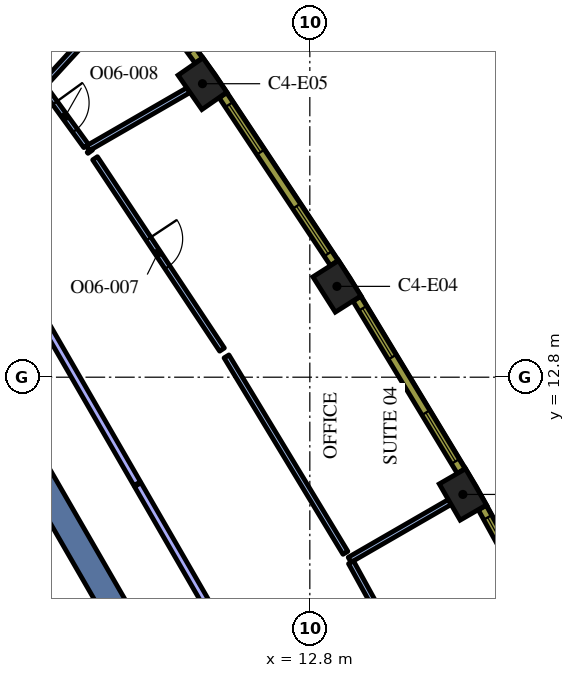
"""IFC4 building model, lengths in metres.
Left out: names, types, materials, properties, quantities, classifications, styles, units other than length and angle.
Written with IfcOpenShell. Run it as: python <this file> out.ifc"""

import sys

from ifc_helpers import new_model, si_unit, direction, frame, frame_2d, origin, origin_2d, place, context, subcontext, project, spatial, polyline, rectangle, outline, extrude, element, fill, save


model = new_model("IFC4")
c1 = context("Model", 3, precision=1e-05, world=origin(), true_north=direction((0.0, 1.0)))
c2 = subcontext(c1, "Body", "Model", "MODEL_VIEW")
j1 = project(units=[si_unit("LENGTHUNIT", "METRE"), si_unit("PLANEANGLEUNIT", "RADIAN")], contexts=[c1])
p1 = place(None, origin())
s1 = spatial("IfcSite", under=j1, at=p1, CompositionType="ELEMENT")
p2 = place(p1, origin())
s2 = spatial("IfcBuilding", under=s1, at=p2, CompositionType="ELEMENT")
p3 = place(p2, frame((0.0, 0.0, 210.0)))
s3 = spatial("IfcBuildingStorey", under=s2, at=p3, CompositionType="ELEMENT", Elevation=210.0)
for number, where, z_axis, x_axis in (
    (1, (16.827, 9.715, 0.0), (0.0, 0.0, 1.0), (-0.5, 0.866, 0.0)),
    (2, (13.513, 15.19, 0.0), (0.0, 0.0, 1.0), (-0.536, 0.845, 0.0)),
    (3, (9.975, 20.522, 0.0), (0.0, 0.0, 1.0), (-0.57, 0.822, 0.0)),
):
    element("IfcColumn", number, at=place(p3, frame(where, z_axis=z_axis, x_axis=x_axis)), inside=s3, PredefinedType="COLUMN", context=c2, shape_type="SweptSolid", body=[
        extrude(rectangle(XDim=1.1, YDim=0.8, at=origin_2d()), origin(), (0.0, 0.0, 1.0), 4.2),
    ])
p4 = place(p3, frame((8.235, 5.736, 0.0), z_axis=(0.0, 0.0, 1.0), x_axis=(-0.499983401189, 0.8660349869, 0.0)))
e4 = element("IfcWall", 4, at=p4, inside=s3, PredefinedType="SOLIDWALL", context=c2, shape_type="SweptSolid", body=[
    extrude(rectangle(XDim=12.472, YDim=0.7, at=frame_2d((6.236, 0.0))), origin(), (0.0, 0.0, 1.0), 4.2),
])
p5 = place(p3, origin())
e5 = element("IfcWall", 5, at=p5, inside=s3, PredefinedType="SOLIDWALL", context=c2, shape_type="SweptSolid", body=[
    extrude(outline(polyline([(0.332, 6.925), (0.335, 6.925), (0.335, 6.925), (0.335, 6.925), (0.335, 7.075), (0.335, 7.075), (0.335, 7.075), (0.245, 7.075), (0.035, 7.439), (0.252, 7.564), (0.377, 7.348), (1.512, 5.382), (1.637, 5.165), (2.221, 4.153), (2.771, 3.199), (2.896, 2.983), (3.138, 2.564), (4.031, 1.017), (4.156, 0.801), (5.292, -1.165), (5.417, -1.382), (6.073, -2.519), (6.552, -3.348), (6.677, -3.564), (6.46, -3.689), (0.332, 6.925)])), origin(), (0.0, 0.0, 1.0), 4.2),
])
p6 = place(p3, frame((8.565, -2.185, 0.0), z_axis=(0.0, 0.0, 1.0), x_axis=(-0.499997954832, 0.866026584559, 0.0)))
e6 = element("IfcWall", 6, at=p6, inside=s3, PredefinedType="SOLIDWALL", context=c2, shape_type="SweptSolid", body=[
    extrude(rectangle(XDim=12.35, YDim=0.25, at=frame_2d((6.175, 0.0))), origin(), (0.0, 0.0, 1.0), 4.2),
])
p7 = place(p6, frame((0.585, 0.0, 0.0)))
e7 = element("IfcOpeningElement", 7, at=p7, cuts=e6, PredefinedType="OPENING", context=c2, shape_type="SweptSolid", body=[
    extrude(rectangle(XDim=1.1, YDim=2.1, at=frame_2d((0.55, 1.05))), frame((0.0, 0.135, 0.0), z_axis=(0.0, -1.0, 0.0), x_axis=(1.0, 0.0, 0.0)), (0.0, 0.0, 1.0), 0.27),
])
p8 = place(p3, frame((13.848, 7.995, 0.0), z_axis=(0.0, 0.0, 1.0), x_axis=(0.86603583403, 0.49998193385, 0.0)))
e8 = element("IfcWall", 8, at=p8, inside=s3, PredefinedType="PARTITIONING", context=c2, shape_type="SweptSolid", body=[
    extrude(rectangle(XDim=3.041, YDim=0.15, at=frame_2d((1.52, 0.0))), origin(), (0.0, 0.0, 1.0), 3.45),
])
p9 = place(p3, frame((16.76, 2.7, 0.0), z_axis=(0.0, 0.0, 1.0), x_axis=(-0.481907755985, 0.876221955169, 0.0)))
e9 = element("IfcWall", 9, at=p9, inside=s3, PredefinedType="PARTITIONING", context=c2, shape_type="SweptSolid", body=[
    extrude(rectangle(XDim=5.967, YDim=0.15, at=frame_2d((2.984, 0.0))), origin(), (0.0, 0.0, 1.0), 3.45),
])
p10 = place(p3, frame((6.958, 18.823, 0.0), z_axis=(0.0, 0.0, 1.0), x_axis=(0.866008752819, 0.500028839209, 0.0)))
e10 = element("IfcWall", 10, at=p10, inside=s3, PredefinedType="PARTITIONING", context=c2, shape_type="SweptSolid", body=[
    extrude(rectangle(XDim=3.058, YDim=0.15, at=frame_2d((1.529, 0.0))), origin(), (0.0, 0.0, 1.0), 3.45),
])
p11 = place(p3, frame((13.737, 8.178, 0.0), z_axis=(0.0, 0.0, 1.0), x_axis=(-0.517884383874, 0.855450620983, 0.0)))
e11 = element("IfcWall", 11, at=p11, inside=s3, PredefinedType="PARTITIONING", context=c2, shape_type="SweptSolid", body=[
    extrude(rectangle(XDim=6.043, YDim=0.15, at=frame_2d((3.021, 0.0))), origin(), (0.0, 0.0, 1.0), 3.45),
])
p12 = place(p3, frame((7.148, 18.561, 0.0), z_axis=(0.0, 0.0, 1.0), x_axis=(0.552890023891, -0.833254235802, 0.0)))
e12 = element("IfcWall", 12, at=p12, inside=s3, PredefinedType="PARTITIONING", context=c2, shape_type="SweptSolid", body=[
    extrude(rectangle(XDim=6.042, YDim=0.15, at=frame_2d((3.021, 0.0))), origin(), (0.0, 0.0, 1.0), 3.45),
])
p13 = place(p12, frame((2.542, 0.0, 0.0)))
e13 = element("IfcOpeningElement", 13, at=p13, cuts=e12, PredefinedType="OPENING", context=c2, shape_type="SweptSolid", body=[
    extrude(rectangle(XDim=0.9, YDim=2.1, at=frame_2d((0.45, 1.05))), frame((0.0, 0.085, 0.0), z_axis=(0.0, -1.0, 0.0), x_axis=(1.0, 0.0, 0.0)), (0.0, 0.0, 1.0), 0.17),
])
p14 = place(p3, frame((7.022, 18.734, 0.0), z_axis=(0.0, 0.0, 1.0), x_axis=(-0.585233084123, 0.810865116556, 0.0)))
e14 = element("IfcWall", 14, at=p14, inside=s3, PredefinedType="PARTITIONING", context=c2, shape_type="SweptSolid", body=[
    extrude(rectangle(XDim=0.035, YDim=0.15, at=frame_2d((0.017, 0.0))), origin(), (0.0, 0.0, 1.0), 3.45),
])
p15 = place(p3, frame((5.764, 20.469, 0.0), z_axis=(0.0, 0.0, 1.0), x_axis=(0.586969615341, -0.809608961577, 0.0)))
e15 = element("IfcWall", 15, at=p15, inside=s3, PredefinedType="PARTITIONING", context=c2, shape_type="SweptSolid", body=[
    extrude(rectangle(XDim=1.957, YDim=0.15, at=frame_2d((0.979, 0.0))), origin(), (0.0, 0.0, 1.0), 3.45),
])
p16 = place(p15, frame((0.558, 0.0, 0.0)))
e16 = element("IfcOpeningElement", 16, at=p16, cuts=e15, PredefinedType="OPENING", context=c2, shape_type="SweptSolid", body=[
    extrude(rectangle(XDim=0.9, YDim=2.1, at=frame_2d((0.45, 1.05))), frame((0.0, 0.085, 0.0), z_axis=(0.0, -1.0, 0.0), x_axis=(1.0, 0.0, 0.0)), (0.0, 0.0, 1.0), 0.17),
])
p17 = place(p3, frame((5.816, 20.526, 0.0), z_axis=(0.0, 0.0, 1.0), x_axis=(0.675700046709, 0.737176672771, 0.0)))
e17 = element("IfcWall", 17, at=p17, inside=s3, PredefinedType="PARTITIONING", context=c2, shape_type="SweptSolid", body=[
    extrude(rectangle(XDim=3.598, YDim=0.15, at=frame_2d((1.799, 0.0))), origin(), (0.0, 0.0, 1.0), 3.45),
])
p18 = place(p3, frame((12.772, 2.178, 0.0), z_axis=(0.0, 0.0, 1.0), x_axis=(-0.5000018851, 0.866024315419, 0.0)))
e18 = element("IfcWall", 18, at=p18, inside=s3, PredefinedType="PARTITIONING", context=c2, shape_type="SweptSolid", body=[
    extrude(rectangle(XDim=9.0, YDim=0.2, at=frame_2d((4.5, 0.0))), origin(), (0.0, 0.0, 1.0), 3.45),
])
p19 = place(p3, frame((8.257, 9.998, 0.0), z_axis=(0.0, 0.0, 1.0), x_axis=(-0.499998405424, 0.866026324412, 0.0)))
e19 = element("IfcWall", 19, at=p19, inside=s3, PredefinedType="PARTITIONING", context=c2, shape_type="SweptSolid", body=[
    extrude(rectangle(XDim=9.267, YDim=0.2, at=frame_2d((4.633, 0.0))), origin(), (0.0, 0.0, 1.0), 3.45),
])
p20 = place(p3, frame((19.892, 4.725, 0.0), z_axis=(0.0, 0.0, 1.0), x_axis=(-0.481925825015, 0.876212017256, 0.0)))
e20 = element("IfcWall", 20, at=p20, inside=s3, PredefinedType="SOLIDWALL", context=c2, shape_type="SweptSolid", body=[
    extrude(rectangle(XDim=5.299, YDim=0.24, at=frame_2d((2.649, 0.0))), origin(), (0.0, 0.0, 1.0), 3.95),
])
p21 = place(p20, frame((0.295, 0.0, 0.9)))
e21 = element("IfcOpeningElement", 21, at=p21, cuts=e20, PredefinedType="OPENING", context=c2, shape_type="SweptSolid", body=[
    extrude(rectangle(XDim=1.5, YDim=2.55, at=frame_2d((0.75, 1.275))), frame((0.0, 0.13, 0.0), z_axis=(0.0, -1.0, 0.0), x_axis=(1.0, 0.0, 0.0)), (0.0, 0.0, 1.0), 0.26),
])
p22 = place(p20, frame((3.504, 0.0, 0.9)))
e22 = element("IfcOpeningElement", 22, at=p22, cuts=e20, PredefinedType="OPENING", context=c2, shape_type="SweptSolid", body=[
    extrude(rectangle(XDim=1.5, YDim=2.55, at=frame_2d((0.75, 1.275))), frame((0.0, 0.13, 0.0), z_axis=(0.0, -1.0, 0.0), x_axis=(1.0, 0.0, 0.0)), (0.0, 0.0, 1.0), 0.26),
])
p23 = place(p3, frame((16.782, 10.331, 0.0), z_axis=(0.0, 0.0, 1.0), x_axis=(-0.517846166225, 0.855473756538, 0.0)))
e23 = element("IfcWall", 23, at=p23, inside=s3, PredefinedType="SOLIDWALL", context=c2, shape_type="SweptSolid", body=[
    extrude(rectangle(XDim=5.298, YDim=0.24, at=frame_2d((2.649, 0.0))), origin(), (0.0, 0.0, 1.0), 3.95),
])
p24 = place(p23, frame((0.294, 0.0, 0.9)))
e24 = element("IfcOpeningElement", 24, at=p24, cuts=e23, PredefinedType="OPENING", context=c2, shape_type="SweptSolid", body=[
    extrude(rectangle(XDim=1.5, YDim=2.55, at=frame_2d((0.75, 1.275))), frame((0.0, 0.13, 0.0), z_axis=(0.0, -1.0, 0.0), x_axis=(1.0, 0.0, 0.0)), (0.0, 0.0, 1.0), 0.26),
])
p25 = place(p23, frame((3.504, 0.0, 0.9)))
e25 = element("IfcOpeningElement", 25, at=p25, cuts=e23, PredefinedType="OPENING", context=c2, shape_type="SweptSolid", body=[
    extrude(rectangle(XDim=1.5, YDim=2.55, at=frame_2d((0.75, 1.275))), frame((0.0, 0.13, 0.0), z_axis=(0.0, -1.0, 0.0), x_axis=(1.0, 0.0, 0.0)), (0.0, 0.0, 1.0), 0.26),
])
p26 = place(p3, frame((13.442, 15.803, 0.0), z_axis=(0.0, 0.0, 1.0), x_axis=(-0.552901821755, 0.833246407433, 0.0)))
e26 = element("IfcWall", 26, at=p26, inside=s3, PredefinedType="SOLIDWALL", context=c2, shape_type="SweptSolid", body=[
    extrude(rectangle(XDim=5.298, YDim=0.24, at=frame_2d((2.649, 0.0))), origin(), (0.0, 0.0, 1.0), 3.95),
])
p27 = place(p26, frame((0.295, 0.0, 0.9)))
e27 = element("IfcOpeningElement", 27, at=p27, cuts=e26, PredefinedType="OPENING", context=c2, shape_type="SweptSolid", body=[
    extrude(rectangle(XDim=1.5, YDim=2.55, at=frame_2d((0.75, 1.275))), frame((0.0, 0.13, 0.0), z_axis=(0.0, -1.0, 0.0), x_axis=(1.0, 0.0, 0.0)), (0.0, 0.0, 1.0), 0.26),
])
p28 = place(p26, frame((3.504, 0.0, 0.9)))
e28 = element("IfcOpeningElement", 28, at=p28, cuts=e26, PredefinedType="OPENING", context=c2, shape_type="SweptSolid", body=[
    extrude(rectangle(XDim=1.5, YDim=2.55, at=frame_2d((0.75, 1.275))), frame((0.0, 0.13, 0.0), z_axis=(0.0, -1.0, 0.0), x_axis=(1.0, 0.0, 0.0)), (0.0, 0.0, 1.0), 0.26),
])
p29 = place(p3, frame((9.878, 21.132, 0.0), z_axis=(0.0, 0.0, 1.0), x_axis=(-0.586998456641, 0.80958805074, 0.0)))
e29 = element("IfcWall", 29, at=p29, inside=s3, PredefinedType="SOLIDWALL", context=c2, shape_type="SweptSolid", body=[
    extrude(rectangle(XDim=5.311, YDim=0.24, at=frame_2d((2.655, 0.0))), origin(), (0.0, 0.0, 1.0), 3.95),
])
p30 = place(p29, frame((0.306, 0.0, 0.9)))
e30 = element("IfcOpeningElement", 30, at=p30, cuts=e29, PredefinedType="OPENING", context=c2, shape_type="SweptSolid", body=[
    extrude(rectangle(XDim=1.5, YDim=2.55, at=frame_2d((0.75, 1.275))), frame((0.0, 0.13, 0.0), z_axis=(0.0, -1.0, 0.0), x_axis=(1.0, 0.0, 0.0)), (0.0, 0.0, 1.0), 0.26),
])
p31 = place(p29, frame((3.539, 0.0, 0.9)))
e31 = element("IfcOpeningElement", 31, at=p31, cuts=e29, PredefinedType="OPENING", context=c2, shape_type="SweptSolid", body=[
    extrude(rectangle(XDim=1.5, YDim=2.55, at=frame_2d((0.75, 1.275))), frame((0.0, 0.13, 0.0), z_axis=(0.0, -1.0, 0.0), x_axis=(1.0, 0.0, 0.0)), (0.0, 0.0, 1.0), 0.26),
])
p32 = place(p13, origin())
e32 = element("IfcDoor", 32, at=p32, inside=s3, OperationType="SINGLE_SWING_LEFT", PredefinedType="DOOR", context=c2, shape_type="SweptSolid", body=[
    extrude(rectangle(XDim=0.9, YDim=2.1, at=frame_2d((0.45, 1.05))), frame((0.0, 0.025, 0.0), z_axis=(0.0, -1.0, 0.0), x_axis=(1.0, 0.0, 0.0)), (0.0, 0.0, 1.0), 0.05),
])
fill(e13, e32)
p33 = place(p16, origin())
e33 = element("IfcDoor", 33, at=p33, inside=s3, OperationType="SINGLE_SWING_RIGHT", PredefinedType="DOOR", context=c2, shape_type="SweptSolid", body=[
    extrude(rectangle(XDim=0.9, YDim=2.1, at=frame_2d((0.45, 1.05))), frame((0.0, 0.025, 0.0), z_axis=(0.0, -1.0, 0.0), x_axis=(1.0, 0.0, 0.0)), (0.0, 0.0, 1.0), 0.05),
])
fill(e16, e33)
p34 = place(p22, origin())
e34 = element("IfcWindow", 34, at=p34, inside=s3, PartitioningType="SINGLE_PANEL", PredefinedType="WINDOW", context=c2, shape_type="SweptSolid", body=[
    extrude(rectangle(XDim=1.5, YDim=2.55, at=frame_2d((0.75, 1.275))), frame((0.0, 0.04, 0.0), z_axis=(0.0, -1.0, 0.0), x_axis=(1.0, 0.0, 0.0)), (0.0, 0.0, 1.0), 0.06),
])
fill(e22, e34)
p35 = place(p24, origin())
e35 = element("IfcWindow", 35, at=p35, inside=s3, PartitioningType="SINGLE_PANEL", PredefinedType="WINDOW", context=c2, shape_type="SweptSolid", body=[
    extrude(rectangle(XDim=1.5, YDim=2.55, at=frame_2d((0.75, 1.275))), frame((0.0, 0.04, 0.0), z_axis=(0.0, -1.0, 0.0), x_axis=(1.0, 0.0, 0.0)), (0.0, 0.0, 1.0), 0.06),
])
fill(e24, e35)
p36 = place(p25, origin())
e36 = element("IfcWindow", 36, at=p36, inside=s3, PartitioningType="SINGLE_PANEL", PredefinedType="WINDOW", context=c2, shape_type="SweptSolid", body=[
    extrude(rectangle(XDim=1.5, YDim=2.55, at=frame_2d((0.75, 1.275))), frame((0.0, 0.04, 0.0), z_axis=(0.0, -1.0, 0.0), x_axis=(1.0, 0.0, 0.0)), (0.0, 0.0, 1.0), 0.06),
])
fill(e25, e36)
p37 = place(p27, origin())
e37 = element("IfcWindow", 37, at=p37, inside=s3, PartitioningType="SINGLE_PANEL", PredefinedType="WINDOW", context=c2, shape_type="SweptSolid", body=[
    extrude(rectangle(XDim=1.5, YDim=2.55, at=frame_2d((0.75, 1.275))), frame((0.0, 0.04, 0.0), z_axis=(0.0, -1.0, 0.0), x_axis=(1.0, 0.0, 0.0)), (0.0, 0.0, 1.0), 0.06),
])
fill(e27, e37)
p38 = place(p28, origin())
e38 = element("IfcWindow", 38, at=p38, inside=s3, PartitioningType="SINGLE_PANEL", PredefinedType="WINDOW", context=c2, shape_type="SweptSolid", body=[
    extrude(rectangle(XDim=1.5, YDim=2.55, at=frame_2d((0.75, 1.275))), frame((0.0, 0.04, 0.0), z_axis=(0.0, -1.0, 0.0), x_axis=(1.0, 0.0, 0.0)), (0.0, 0.0, 1.0), 0.06),
])
fill(e28, e38)
save(model, sys.argv[1])
